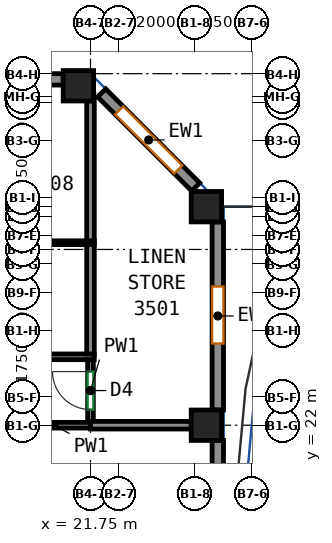
"""IFC4 building model, lengths in metres.
Left out: names, types, materials, properties, quantities, classifications, styles, units other than length and angle.
Written with IfcOpenShell. Run it as: python <this file> out.ifc"""

import sys

from ifc_helpers import new_model, si_unit, direction, frame, frame_2d, origin, origin_2d, place, context, subcontext, project, spatial, rectangle, extrude, source, transform, mapped, element, fill, save


model = new_model("IFC4")
c1 = context("Model", 3, precision=1e-05, world=origin(), true_north=direction((0.0, 1.0)))
c2 = subcontext(c1, "Body", "Model", "MODEL_VIEW")
j1 = project(units=[si_unit("LENGTHUNIT", "METRE"), si_unit("PLANEANGLEUNIT", "RADIAN")], contexts=[c1])
p1 = place(None, origin())
s1 = spatial("IfcSite", under=j1, at=p1, CompositionType="ELEMENT")
p2 = place(p1, origin())
s2 = spatial("IfcBuilding", under=s1, at=p2, CompositionType="ELEMENT")
p3 = place(p2, frame((0.0, 0.0, 154.1)))
s3 = spatial("IfcBuildingStorey", under=s2, at=p3, CompositionType="ELEMENT", Elevation=154.1)
m1 = source(origin(), c2, "Body", "SweptSolid", [
    extrude(rectangle(XDim=0.8, YDim=0.8, at=origin_2d()), origin(), (0.0, 0.0, 1.0), 3.12),
])
for number, where, z_axis, x_axis in (
    (1, (21.432, 30.932, 0.0), (0.0, 0.0, 1.0), (1.0, 0.0, 0.0)),
    (2, (24.8, 22.0, 0.0), (0.0, 0.0, 1.0), (1.0, 0.0, 0.0)),
    (3, (24.8, 27.75, 0.0), (0.0, 0.0, 1.0), (1.0, 0.0, 0.0)),
):
    element("IfcColumn", number, at=place(p3, frame(where, z_axis=z_axis, x_axis=x_axis)), inside=s3, PredefinedType="COLUMN", context=c2, shape_type="MappedRepresentation", body=[
        mapped(m1, transform((0.0, 0.0, 0.0))),
    ])
m2 = source(origin(), c2, "Body", "SweptSolid", [
    extrude(rectangle(XDim=13.2, YDim=0.3, at=frame_2d((6.6, 0.0))), origin(), (0.0, 0.0, 1.0), 3.12),
])
p4 = place(p3, frame((25.1, 8.4, 0.0), z_axis=(0.0, 0.0, 1.0), x_axis=(0.0, 1.0, 0.0)))
e4 = element("IfcWall", 4, at=p4, inside=s3, PredefinedType="SOLIDWALL", context=c2, shape_type="MappedRepresentation", body=[
    mapped(m2, transform((0.0, 0.0, 0.0))),
])
p5 = place(p4, frame((0.9, 0.0, 0.85)))
e5 = element("IfcOpeningElement", 5, at=p5, cuts=e4, PredefinedType="OPENING", context=c2, shape_type="SweptSolid", body=[
    extrude(rectangle(XDim=1.5, YDim=1.95, at=frame_2d((0.75, 0.975))), frame((0.0, 0.16, 0.0), z_axis=(0.0, -1.0, 0.0), x_axis=(1.0, 0.0, 0.0)), (0.0, 0.0, 1.0), 0.32),
])
p6 = place(p4, frame((4.2, 0.0, 0.85)))
e6 = element("IfcOpeningElement", 6, at=p6, cuts=e4, PredefinedType="OPENING", context=c2, shape_type="SweptSolid", body=[
    extrude(rectangle(XDim=1.5, YDim=1.95, at=frame_2d((0.75, 0.975))), frame((0.0, 0.16, 0.0), z_axis=(0.0, -1.0, 0.0), x_axis=(1.0, 0.0, 0.0)), (0.0, 0.0, 1.0), 0.32),
])
p7 = place(p4, frame((7.5, 0.0, 0.85)))
e7 = element("IfcOpeningElement", 7, at=p7, cuts=e4, PredefinedType="OPENING", context=c2, shape_type="SweptSolid", body=[
    extrude(rectangle(XDim=1.5, YDim=1.95, at=frame_2d((0.75, 0.975))), frame((0.0, 0.16, 0.0), z_axis=(0.0, -1.0, 0.0), x_axis=(1.0, 0.0, 0.0)), (0.0, 0.0, 1.0), 0.32),
])
p8 = place(p4, frame((10.8, 0.0, 0.85)))
e8 = element("IfcOpeningElement", 8, at=p8, cuts=e4, PredefinedType="OPENING", context=c2, shape_type="SweptSolid", body=[
    extrude(rectangle(XDim=1.5, YDim=1.95, at=frame_2d((0.75, 0.975))), frame((0.0, 0.16, 0.0), z_axis=(0.0, -1.0, 0.0), x_axis=(1.0, 0.0, 0.0)), (0.0, 0.0, 1.0), 0.32),
])
m3 = source(origin(), c2, "Body", "SweptSolid", [
    extrude(rectangle(XDim=4.95, YDim=0.3, at=frame_2d((2.475, 0.0))), origin(), (0.0, 0.0, 1.0), 3.12),
])
p9 = place(p3, frame((25.1, 22.4, 0.0), z_axis=(0.0, 0.0, 1.0), x_axis=(0.0, 1.0, 0.0)))
e9 = element("IfcWall", 9, at=p9, inside=s3, PredefinedType="SOLIDWALL", context=c2, shape_type="MappedRepresentation", body=[
    mapped(m3, transform((0.0, 0.0, 0.0))),
])
p10 = place(p9, frame((1.75, 0.0, 0.85)))
e10 = element("IfcOpeningElement", 10, at=p10, cuts=e9, PredefinedType="OPENING", context=c2, shape_type="SweptSolid", body=[
    extrude(rectangle(XDim=1.5, YDim=1.95, at=frame_2d((0.75, 0.975))), frame((0.0, 0.16, 0.0), z_axis=(0.0, -1.0, 0.0), x_axis=(1.0, 0.0, 0.0)), (0.0, 0.0, 1.0), 0.32),
])
m4 = source(origin(), c2, "Body", "SweptSolid", [
    extrude(rectangle(XDim=3.5, YDim=0.3, at=frame_2d((1.75, 0.0))), origin(), (0.0, 0.0, 1.0), 3.12),
])
p11 = place(p3, frame((24.519, 28.269, 0.0), z_axis=(0.0, 0.0, 1.0), x_axis=(-0.70707190453, 0.707141656123, 0.0)))
e11 = element("IfcWall", 11, at=p11, inside=s3, PredefinedType="SOLIDWALL", context=c2, shape_type="MappedRepresentation", body=[
    mapped(m4, transform((0.0, 0.0, 0.0))),
])
p12 = place(p11, frame((0.65, 0.0, 0.85)))
e12 = element("IfcOpeningElement", 12, at=p12, cuts=e11, PredefinedType="OPENING", context=c2, shape_type="SweptSolid", body=[
    extrude(rectangle(XDim=2.2, YDim=1.95, at=frame_2d((1.1, 0.975))), frame((0.0, 0.16, 0.0), z_axis=(0.0, -1.0, 0.0), x_axis=(1.0, 0.0, 0.0)), (0.0, 0.0, 1.0), 0.32),
])
m5 = source(origin(), c2, "Body", "SweptSolid", [
    extrude(rectangle(XDim=6.465, YDim=0.3, at=frame_2d((3.232, 0.0))), origin(), (0.0, 0.0, 1.0), 3.12),
])
p13 = place(p3, frame((21.032, 31.1, 0.0), z_axis=(0.0, 0.0, 1.0), x_axis=(-1.0, 0.0, 0.0)))
e13 = element("IfcWall", 13, at=p13, inside=s3, PredefinedType="SOLIDWALL", context=c2, shape_type="MappedRepresentation", body=[
    mapped(m5, transform((0.0, 0.0, 0.0))),
])
p14 = place(p13, frame((0.516, 0.0, 0.85)))
e14 = element("IfcOpeningElement", 14, at=p14, cuts=e13, PredefinedType="OPENING", context=c2, shape_type="SweptSolid", body=[
    extrude(rectangle(XDim=2.2, YDim=1.95, at=frame_2d((1.1, 0.975))), frame((0.0, 0.16, 0.0), z_axis=(0.0, -1.0, 0.0), x_axis=(1.0, 0.0, 0.0)), (0.0, 0.0, 1.0), 0.32),
])
p15 = place(p13, frame((3.749, 0.0, 0.85)))
e15 = element("IfcOpeningElement", 15, at=p15, cuts=e13, PredefinedType="OPENING", context=c2, shape_type="SweptSolid", body=[
    extrude(rectangle(XDim=2.2, YDim=1.95, at=frame_2d((1.1, 0.975))), frame((0.0, 0.16, 0.0), z_axis=(0.0, -1.0, 0.0), x_axis=(1.0, 0.0, 0.0)), (0.0, 0.0, 1.0), 0.32),
])
p16 = place(p3, frame((-20.059, 23.8, 0.0), z_axis=(0.0, 0.0, 1.0), x_axis=(1.0, 0.0, 0.0)))
e16 = element("IfcWall", 16, at=p16, inside=s3, PredefinedType="PARTITIONING", context=c2, shape_type="SweptSolid", body=[
    extrude(rectangle(XDim=41.909, YDim=0.15, at=frame_2d((20.955, 0.0))), origin(), (0.0, 0.0, 1.0), 3.12),
])
p17 = place(p16, frame((5.293, 0.0, 0.0)))
e17 = element("IfcOpeningElement", 17, at=p17, cuts=e16, PredefinedType="OPENING", context=c2, shape_type="SweptSolid", body=[
    extrude(rectangle(XDim=1.0, YDim=2.1, at=frame_2d((0.5, 1.05))), frame((0.0, 0.085, 0.0), z_axis=(0.0, -1.0, 0.0), x_axis=(1.0, 0.0, 0.0)), (0.0, 0.0, 1.0), 0.17),
])
p18 = place(p16, frame((9.275, 0.0, 0.0)))
e18 = element("IfcOpeningElement", 18, at=p18, cuts=e16, PredefinedType="OPENING", context=c2, shape_type="SweptSolid", body=[
    extrude(rectangle(XDim=1.0, YDim=2.1, at=frame_2d((0.5, 1.05))), frame((0.0, 0.085, 0.0), z_axis=(0.0, -1.0, 0.0), x_axis=(1.0, 0.0, 0.0)), (0.0, 0.0, 1.0), 0.17),
])
p19 = place(p16, frame((18.292, 0.0, 0.0)))
e19 = element("IfcOpeningElement", 19, at=p19, cuts=e16, PredefinedType="OPENING", context=c2, shape_type="SweptSolid", body=[
    extrude(rectangle(XDim=1.0, YDim=2.1, at=frame_2d((0.5, 1.05))), frame((0.0, 0.085, 0.0), z_axis=(0.0, -1.0, 0.0), x_axis=(1.0, 0.0, 0.0)), (0.0, 0.0, 1.0), 0.17),
])
p20 = place(p16, frame((30.636, 0.0, 0.0)))
e20 = element("IfcOpeningElement", 20, at=p20, cuts=e16, PredefinedType="OPENING", context=c2, shape_type="SweptSolid", body=[
    extrude(rectangle(XDim=1.0, YDim=2.1, at=frame_2d((0.5, 1.05))), frame((0.0, 0.085, 0.0), z_axis=(0.0, -1.0, 0.0), x_axis=(1.0, 0.0, 0.0)), (0.0, 0.0, 1.0), 0.17),
])
p21 = place(p16, frame((36.828, 0.0, 0.0)))
e21 = element("IfcOpeningElement", 21, at=p21, cuts=e16, PredefinedType="OPENING", context=c2, shape_type="SweptSolid", body=[
    extrude(rectangle(XDim=1.0, YDim=2.1, at=frame_2d((0.5, 1.05))), frame((0.0, 0.085, 0.0), z_axis=(0.0, -1.0, 0.0), x_axis=(1.0, 0.0, 0.0)), (0.0, 0.0, 1.0), 0.17),
])
p22 = place(p16, frame((38.314, 0.0, 0.0)))
e22 = element("IfcOpeningElement", 22, at=p22, cuts=e16, PredefinedType="OPENING", context=c2, shape_type="SweptSolid", body=[
    extrude(rectangle(XDim=1.0, YDim=2.1, at=frame_2d((0.5, 1.05))), frame((0.0, 0.085, 0.0), z_axis=(0.0, -1.0, 0.0), x_axis=(1.0, 0.0, 0.0)), (0.0, 0.0, 1.0), 0.17),
])
p23 = place(p3, frame((21.75, 22.1, 0.0), z_axis=(0.0, 0.0, 1.0), x_axis=(0.0, 1.0, 0.0)))
e23 = element("IfcWall", 23, at=p23, inside=s3, PredefinedType="PARTITIONING", context=c2, shape_type="SweptSolid", body=[
    extrude(rectangle(XDim=1.625, YDim=0.15, at=frame_2d((0.812, 0.0))), origin(), (0.0, 0.0, 1.0), 3.12),
])
p24 = place(p23, frame((0.312, 0.0, 0.0)))
e24 = element("IfcOpeningElement", 24, at=p24, cuts=e23, PredefinedType="OPENING", context=c2, shape_type="SweptSolid", body=[
    extrude(rectangle(XDim=1.0, YDim=2.1, at=frame_2d((0.5, 1.05))), frame((0.0, 0.085, 0.0), z_axis=(0.0, -1.0, 0.0), x_axis=(1.0, 0.0, 0.0)), (0.0, 0.0, 1.0), 0.17),
])
p25 = place(p3, frame((19.825, 22.0, 0.0), z_axis=(0.0, 0.0, 1.0), x_axis=(1.0, 0.0, 0.0)))
e25 = element("IfcWall", 25, at=p25, inside=s3, PredefinedType="PARTITIONING", context=c2, shape_type="SweptSolid", body=[
    extrude(rectangle(XDim=1.925, YDim=0.15, at=frame_2d((0.962, 0.0))), origin(), (0.0, 0.0, 1.0), 3.12),
])
p26 = place(p3, frame((19.5, 26.802, 0.0), z_axis=(0.0, 0.0, 1.0), x_axis=(1.0, 0.0, 0.0)))
e26 = element("IfcWall", 26, at=p26, inside=s3, PredefinedType="PARTITIONING", context=c2, shape_type="SweptSolid", body=[
    extrude(rectangle(XDim=2.35, YDim=0.1, at=frame_2d((1.175, 0.0))), origin(), (0.0, 0.0, 1.0), 3.12),
])
p27 = place(p3, frame((21.75, 26.852, 0.0), z_axis=(0.0, 0.0, 1.0), x_axis=(0.0, 1.0, 0.0)))
e27 = element("IfcWall", 27, at=p27, inside=s3, PredefinedType="PARTITIONING", context=c2, shape_type="SweptSolid", body=[
    extrude(rectangle(XDim=3.68, YDim=0.2, at=frame_2d((1.84, 0.0))), origin(), (0.0, 0.0, 1.0), 3.12),
])
p28 = place(p3, frame((21.75, 23.877, 0.0), z_axis=(0.0, 0.0, 1.0), x_axis=(0.0, 1.0, 0.0)))
e28 = element("IfcWall", 28, at=p28, inside=s3, PredefinedType="PARTITIONING", context=c2, shape_type="SweptSolid", body=[
    extrude(rectangle(XDim=2.875, YDim=0.2, at=frame_2d((1.438, 0.0))), origin(), (0.0, 0.0, 1.0), 3.12),
])
p29 = place(p3, frame((21.752, 22.0, 0.0), z_axis=(0.0, 0.0, 1.0), x_axis=(1.0, 0.0, 0.0)))
e29 = element("IfcWall", 29, at=p29, inside=s3, PredefinedType="PARTITIONING", context=c2, shape_type="SweptSolid", body=[
    extrude(rectangle(XDim=2.648, YDim=0.2, at=frame_2d((1.324, 0.0))), origin(), (0.0, 0.0, 1.0), 3.12),
])
p30 = place(p10, origin())
e30 = element("IfcWindow", 30, at=p30, inside=s3, PartitioningType="SINGLE_PANEL", PredefinedType="WINDOW", context=c2, shape_type="SweptSolid", body=[
    extrude(rectangle(XDim=1.5, YDim=1.95, at=frame_2d((0.75, 0.975))), frame((0.0, 0.03, 0.0), z_axis=(0.0, -1.0, 0.0), x_axis=(1.0, 0.0, 0.0)), (0.0, 0.0, 1.0), 0.06),
])
fill(e10, e30)
p31 = place(p12, origin())
e31 = element("IfcWindow", 31, at=p31, inside=s3, PartitioningType="SINGLE_PANEL", PredefinedType="WINDOW", context=c2, shape_type="SweptSolid", body=[
    extrude(rectangle(XDim=2.2, YDim=1.95, at=frame_2d((1.1, 0.975))), frame((0.0, 0.03, 0.0), z_axis=(0.0, -1.0, 0.0), x_axis=(1.0, 0.0, 0.0)), (0.0, 0.0, 1.0), 0.06),
])
fill(e12, e31)
p32 = place(p24, origin())
e32 = element("IfcDoor", 32, at=p32, inside=s3, OperationType="SINGLE_SWING_RIGHT", PredefinedType="DOOR", context=c2, shape_type="SweptSolid", body=[
    extrude(rectangle(XDim=1.0, YDim=2.1, at=frame_2d((0.5, 1.05))), frame((0.0, 0.025, 0.0), z_axis=(0.0, -1.0, 0.0), x_axis=(1.0, 0.0, 0.0)), (0.0, 0.0, 1.0), 0.05),
])
fill(e24, e32)
save(model, sys.argv[1])
